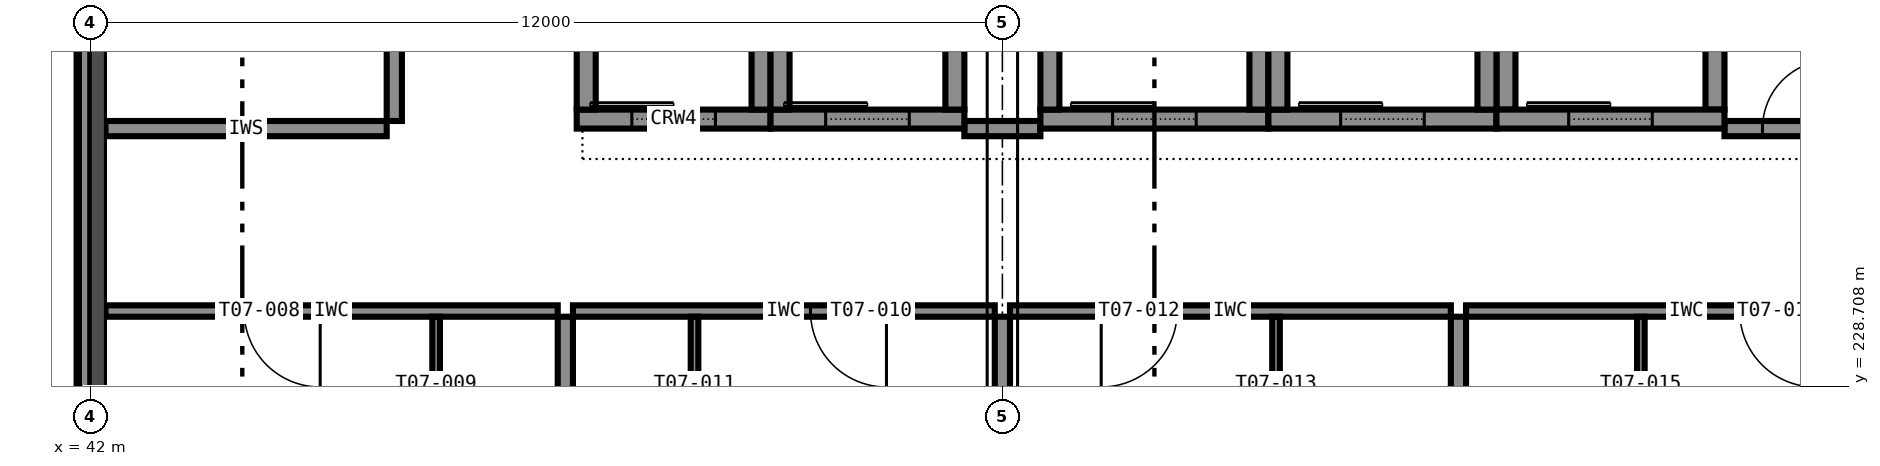
"""IFC4 building model, lengths in metres.
Left out: names, types, materials, properties, quantities, classifications, styles, units other than length and angle.
Written with IfcOpenShell. Run it as: python <this file> out.ifc"""

import sys

from ifc_helpers import new_model, si_unit, direction, frame, frame_2d, origin, place, context, subcontext, project, spatial, rectangle, extrude, element, fill, save


model = new_model("IFC4")
c1 = context("Model", 3, precision=1e-05, world=origin(), true_north=direction((0.0, 1.0)))
c2 = subcontext(c1, "Body", "Model", "MODEL_VIEW")
j1 = project(units=[si_unit("LENGTHUNIT", "METRE"), si_unit("PLANEANGLEUNIT", "RADIAN")], contexts=[c1])
p1 = place(None, origin())
s1 = spatial("IfcSite", under=j1, at=p1, CompositionType="ELEMENT")
p2 = place(p1, origin())
s2 = spatial("IfcBuilding", under=s1, at=p2, CompositionType="ELEMENT")
p3 = place(p2, frame((0.0, 0.0, 35.4)))
s3 = spatial("IfcBuildingStorey", under=s2, at=p3, CompositionType="ELEMENT", Elevation=35.4)
p4 = place(p3, frame((54.5, 232.225, 0.0), z_axis=(0.0, 0.0, 1.0), x_axis=(1.0, 0.0, 0.0)))
e1 = element("IfcWall", 1, at=p4, inside=s3, PredefinedType="SHEAR", context=c2, shape_type="SweptSolid", body=[
    extrude(rectangle(XDim=3.0, YDim=0.25, at=frame_2d((1.5, 0.0))), origin(), (0.0, 0.0, 1.0), 3.6),
])
p5 = place(p4, frame((0.95, 0.0, 0.0)))
e2 = element("IfcOpeningElement", 2, at=p5, cuts=e1, PredefinedType="OPENING", context=c2, shape_type="SweptSolid", body=[
    extrude(rectangle(XDim=1.1, YDim=2.1, at=frame_2d((0.55, 1.05))), frame((0.0, 0.135, 0.0), z_axis=(0.0, -1.0, 0.0), x_axis=(1.0, 0.0, 0.0)), (0.0, 0.0, 1.0), 0.27),
])
for number, where, z_axis, x_axis in (
    (3, (54.625, 232.35, 0.0), (0.0, 0.0, 1.0), (0.0, 1.0, 0.0)),
    (4, (57.375, 232.35, 0.0), (0.0, 0.0, 1.0), (0.0, 1.0, 0.0)),
):
    element("IfcWall", number, at=place(p3, frame(where, z_axis=z_axis, x_axis=x_axis)), inside=s3, PredefinedType="SHEAR", context=c2, shape_type="SweptSolid", body=[
        extrude(rectangle(XDim=3.3, YDim=0.25, at=frame_2d((1.65, 0.0))), origin(), (0.0, 0.0, 1.0), 3.6),
    ])
p6 = place(p3, frame((57.5, 232.225, 0.0), z_axis=(0.0, 0.0, 1.0), x_axis=(1.0, 0.0, 0.0)))
e5 = element("IfcWall", 5, at=p6, inside=s3, PredefinedType="SHEAR", context=c2, shape_type="SweptSolid", body=[
    extrude(rectangle(XDim=3.0, YDim=0.25, at=frame_2d((1.5, 0.0))), origin(), (0.0, 0.0, 1.0), 3.6),
])
p7 = place(p6, frame((0.95, 0.0, 0.0)))
e6 = element("IfcOpeningElement", 6, at=p7, cuts=e5, PredefinedType="OPENING", context=c2, shape_type="SweptSolid", body=[
    extrude(rectangle(XDim=1.1, YDim=2.1, at=frame_2d((0.55, 1.05))), frame((0.0, 0.135, 0.0), z_axis=(0.0, -1.0, 0.0), x_axis=(1.0, 0.0, 0.0)), (0.0, 0.0, 1.0), 0.27),
])
for number, where, z_axis, x_axis in (
    (7, (57.625, 232.35, 0.0), (0.0, 0.0, 1.0), (0.0, 1.0, 0.0)),
    (8, (60.375, 232.35, 0.0), (0.0, 0.0, 1.0), (0.0, 1.0, 0.0)),
):
    element("IfcWall", number, at=place(p3, frame(where, z_axis=z_axis, x_axis=x_axis)), inside=s3, PredefinedType="SHEAR", context=c2, shape_type="SweptSolid", body=[
        extrude(rectangle(XDim=3.3, YDim=0.25, at=frame_2d((1.65, 0.0))), origin(), (0.0, 0.0, 1.0), 3.6),
    ])
p8 = place(p3, frame((60.5, 232.225, 0.0), z_axis=(0.0, 0.0, 1.0), x_axis=(1.0, 0.0, 0.0)))
e9 = element("IfcWall", 9, at=p8, inside=s3, PredefinedType="SHEAR", context=c2, shape_type="SweptSolid", body=[
    extrude(rectangle(XDim=3.0, YDim=0.25, at=frame_2d((1.5, 0.0))), origin(), (0.0, 0.0, 1.0), 3.6),
])
p9 = place(p8, frame((0.95, 0.0, 0.0)))
e10 = element("IfcOpeningElement", 10, at=p9, cuts=e9, PredefinedType="OPENING", context=c2, shape_type="SweptSolid", body=[
    extrude(rectangle(XDim=1.1, YDim=2.1, at=frame_2d((0.55, 1.05))), frame((0.0, 0.135, 0.0), z_axis=(0.0, -1.0, 0.0), x_axis=(1.0, 0.0, 0.0)), (0.0, 0.0, 1.0), 0.27),
])
for number, where, z_axis, x_axis in (
    (11, (60.625, 232.35, 0.0), (0.0, 0.0, 1.0), (0.0, 1.0, 0.0)),
    (12, (63.375, 232.35, 0.0), (0.0, 0.0, 1.0), (0.0, 1.0, 0.0)),
):
    element("IfcWall", number, at=place(p3, frame(where, z_axis=z_axis, x_axis=x_axis)), inside=s3, PredefinedType="SHEAR", context=c2, shape_type="SweptSolid", body=[
        extrude(rectangle(XDim=3.3, YDim=0.25, at=frame_2d((1.65, 0.0))), origin(), (0.0, 0.0, 1.0), 3.6),
    ])
p10 = place(p3, frame((48.4, 232.225, 0.0), z_axis=(0.0, 0.0, 1.0), x_axis=(1.0, 0.0, 0.0)))
e13 = element("IfcWall", 13, at=p10, inside=s3, PredefinedType="SHEAR", context=c2, shape_type="SweptSolid", body=[
    extrude(rectangle(XDim=2.55, YDim=0.25, at=frame_2d((1.275, 0.0))), origin(), (0.0, 0.0, 1.0), 3.6),
])
p11 = place(p10, frame((0.725, 0.0, 0.0)))
e14 = element("IfcOpeningElement", 14, at=p11, cuts=e13, PredefinedType="OPENING", context=c2, shape_type="SweptSolid", body=[
    extrude(rectangle(XDim=1.1, YDim=2.1, at=frame_2d((0.55, 1.05))), frame((0.0, 0.135, 0.0), z_axis=(0.0, -1.0, 0.0), x_axis=(1.0, 0.0, 0.0)), (0.0, 0.0, 1.0), 0.27),
])
for number, where, z_axis, x_axis in (
    (15, (48.525, 232.35, 0.0), (0.0, 0.0, 1.0), (0.0, 1.0, 0.0)),
    (16, (50.825, 232.35, 0.0), (0.0, 0.0, 1.0), (0.0, 1.0, 0.0)),
):
    element("IfcWall", number, at=place(p3, frame(where, z_axis=z_axis, x_axis=x_axis)), inside=s3, PredefinedType="SHEAR", context=c2, shape_type="SweptSolid", body=[
        extrude(rectangle(XDim=3.3, YDim=0.25, at=frame_2d((1.65, 0.0))), origin(), (0.0, 0.0, 1.0), 3.6),
    ])
p12 = place(p3, frame((50.95, 232.225, 0.0), z_axis=(0.0, 0.0, 1.0), x_axis=(1.0, 0.0, 0.0)))
e17 = element("IfcWall", 17, at=p12, inside=s3, PredefinedType="SHEAR", context=c2, shape_type="SweptSolid", body=[
    extrude(rectangle(XDim=2.55, YDim=0.25, at=frame_2d((1.275, 0.0))), origin(), (0.0, 0.0, 1.0), 3.6),
])
p13 = place(p12, frame((0.725, 0.0, 0.0)))
e18 = element("IfcOpeningElement", 18, at=p13, cuts=e17, PredefinedType="OPENING", context=c2, shape_type="SweptSolid", body=[
    extrude(rectangle(XDim=1.1, YDim=2.1, at=frame_2d((0.55, 1.05))), frame((0.0, 0.135, 0.0), z_axis=(0.0, -1.0, 0.0), x_axis=(1.0, 0.0, 0.0)), (0.0, 0.0, 1.0), 0.27),
])
for number, where, z_axis, x_axis in (
    (19, (51.075, 232.35, 0.0), (0.0, 0.0, 1.0), (0.0, 1.0, 0.0)),
    (20, (53.375, 232.35, 0.0), (0.0, 0.0, 1.0), (0.0, 1.0, 0.0)),
):
    element("IfcWall", number, at=place(p3, frame(where, z_axis=z_axis, x_axis=x_axis)), inside=s3, PredefinedType="SHEAR", context=c2, shape_type="SweptSolid", body=[
        extrude(rectangle(XDim=3.3, YDim=0.25, at=frame_2d((1.65, 0.0))), origin(), (0.0, 0.0, 1.0), 3.6),
    ])
p14 = place(p3, frame((41.925, 233.6, 3.4), z_axis=(0.0, 0.0, 1.0), x_axis=(0.0, -1.0, 0.0)))
e21 = element("IfcWall", 21, at=p14, inside=s3, PredefinedType="STANDARD", context=c2, shape_type="SweptSolid", body=[
    extrude(rectangle(XDim=11.2, YDim=0.15, at=frame_2d((5.6, 0.0))), origin(), (0.0, 0.0, 1.0), 0.2),
])
p15 = place(p3, frame((42.2, 232.1, 0.0), z_axis=(0.0, 0.0, 1.0), x_axis=(1.0, 0.0, 0.0)))
e22 = element("IfcWall", 22, at=p15, inside=s3, PredefinedType="PARTITIONING", context=c2, shape_type="SweptSolid", body=[
    extrude(rectangle(XDim=3.7, YDim=0.2, at=frame_2d((1.85, 0.0))), origin(), (0.0, 0.0, 1.0), 3.4),
])
p16 = place(p3, frame((53.5, 232.1, 0.0), z_axis=(0.0, 0.0, 1.0), x_axis=(1.0, 0.0, 0.0)))
e23 = element("IfcWall", 23, at=p16, inside=s3, PredefinedType="PARTITIONING", context=c2, shape_type="SweptSolid", body=[
    extrude(rectangle(XDim=1.0, YDim=0.2, at=frame_2d((0.5, 0.0))), origin(), (0.0, 0.0, 1.0), 3.4),
])
p17 = place(p3, frame((63.5, 232.1, 0.0), z_axis=(0.0, 0.0, 1.0), x_axis=(1.0, 0.0, 0.0)))
e24 = element("IfcWall", 24, at=p17, inside=s3, PredefinedType="PARTITIONING", context=c2, shape_type="SweptSolid", body=[
    extrude(rectangle(XDim=1.9, YDim=0.2, at=frame_2d((0.95, 0.0))), origin(), (0.0, 0.0, 1.0), 3.4),
])
p18 = place(p17, frame((0.5, 0.0, 0.0)))
e25 = element("IfcOpeningElement", 25, at=p18, cuts=e24, PredefinedType="OPENING", context=c2, shape_type="SweptSolid", body=[
    extrude(rectangle(XDim=0.9, YDim=2.1, at=frame_2d((0.45, 1.05))), frame((0.0, 0.11, 0.0), z_axis=(0.0, -1.0, 0.0), x_axis=(1.0, 0.0, 0.0)), (0.0, 0.0, 1.0), 0.22),
])
p19 = place(p3, frame((46.0, 232.2, 0.0), z_axis=(0.0, 0.0, 1.0), x_axis=(0.0, 1.0, 0.0)))
e26 = element("IfcWall", 26, at=p19, inside=s3, PredefinedType="PARTITIONING", context=c2, shape_type="SweptSolid", body=[
    extrude(rectangle(XDim=3.6, YDim=0.2, at=frame_2d((1.8, 0.0))), origin(), (0.0, 0.0, 1.0), 3.4),
])
p20 = place(p19, frame((1.35, 0.0, 0.0)))
e27 = element("IfcOpeningElement", 27, at=p20, cuts=e26, PredefinedType="OPENING", context=c2, shape_type="SweptSolid", body=[
    extrude(rectangle(XDim=0.9, YDim=2.1, at=frame_2d((0.45, 1.05))), frame((0.0, 0.11, 0.0), z_axis=(0.0, -1.0, 0.0), x_axis=(1.0, 0.0, 0.0)), (0.0, 0.0, 1.0), 0.22),
])
p21 = place(p3, frame((48.15, 229.7, 0.0), z_axis=(0.0, 0.0, 1.0), x_axis=(-1.0, 0.0, 0.0)))
e28 = element("IfcWall", 28, at=p21, inside=s3, PredefinedType="PARTITIONING", context=c2, shape_type="SweptSolid", body=[
    extrude(rectangle(XDim=5.95, YDim=0.15, at=frame_2d((2.975, 0.0))), origin(), (0.0, 0.0, 1.0), 3.4),
])
p22 = place(p21, frame((3.125, 0.0, 0.0)))
e29 = element("IfcOpeningElement", 29, at=p22, cuts=e28, PredefinedType="OPENING", context=c2, shape_type="SweptSolid", body=[
    extrude(rectangle(XDim=1.0, YDim=2.1, at=frame_2d((0.5, 1.05))), frame((0.0, 0.085, 0.0), z_axis=(0.0, -1.0, 0.0), x_axis=(1.0, 0.0, 0.0)), (0.0, 0.0, 1.0), 0.17),
])
p23 = place(p3, frame((46.55, 226.75, 0.0), z_axis=(0.0, 0.0, 1.0), x_axis=(0.0, 1.0, 0.0)))
e30 = element("IfcWall", 30, at=p23, inside=s3, PredefinedType="PARTITIONING", context=c2, shape_type="SweptSolid", body=[
    extrude(rectangle(XDim=2.875, YDim=0.1, at=frame_2d((1.438, 0.0))), origin(), (0.0, 0.0, 1.0), 3.4),
])
p24 = place(p23, frame((1.038, 0.0, 0.0)))
e31 = element("IfcOpeningElement", 31, at=p24, cuts=e30, PredefinedType="OPENING", context=c2, shape_type="SweptSolid", body=[
    extrude(rectangle(XDim=0.8, YDim=2.1, at=frame_2d((0.4, 1.05))), frame((0.0, 0.06, 0.0), z_axis=(0.0, -1.0, 0.0), x_axis=(1.0, 0.0, 0.0)), (0.0, 0.0, 1.0), 0.12),
])
p25 = place(p3, frame((53.9, 229.7, 0.0), z_axis=(0.0, 0.0, 1.0), x_axis=(-1.0, 0.0, 0.0)))
e32 = element("IfcWall", 32, at=p25, inside=s3, PredefinedType="PARTITIONING", context=c2, shape_type="SweptSolid", body=[
    extrude(rectangle(XDim=5.55, YDim=0.15, at=frame_2d((2.775, 0.0))), origin(), (0.0, 0.0, 1.0), 3.4),
])
p26 = place(p25, frame((1.425, 0.0, 0.0)))
e33 = element("IfcOpeningElement", 33, at=p26, cuts=e32, PredefinedType="OPENING", context=c2, shape_type="SweptSolid", body=[
    extrude(rectangle(XDim=1.0, YDim=2.1, at=frame_2d((0.5, 1.05))), frame((0.0, 0.085, 0.0), z_axis=(0.0, -1.0, 0.0), x_axis=(1.0, 0.0, 0.0)), (0.0, 0.0, 1.0), 0.17),
])
p27 = place(p3, frame((49.95, 229.625, 0.0), z_axis=(0.0, 0.0, 1.0), x_axis=(0.0, -1.0, 0.0)))
e34 = element("IfcWall", 34, at=p27, inside=s3, PredefinedType="PARTITIONING", context=c2, shape_type="SweptSolid", body=[
    extrude(rectangle(XDim=2.875, YDim=0.1, at=frame_2d((1.438, 0.0))), origin(), (0.0, 0.0, 1.0), 3.4),
])
p28 = place(p27, frame((1.038, 0.0, 0.0)))
e35 = element("IfcOpeningElement", 35, at=p28, cuts=e34, PredefinedType="OPENING", context=c2, shape_type="SweptSolid", body=[
    extrude(rectangle(XDim=0.8, YDim=2.1, at=frame_2d((0.4, 1.05))), frame((0.0, 0.06, 0.0), z_axis=(0.0, -1.0, 0.0), x_axis=(1.0, 0.0, 0.0)), (0.0, 0.0, 1.0), 0.12),
])
p29 = place(p3, frame((59.9, 229.7, 0.0), z_axis=(0.0, 0.0, 1.0), x_axis=(-1.0, 0.0, 0.0)))
e36 = element("IfcWall", 36, at=p29, inside=s3, PredefinedType="PARTITIONING", context=c2, shape_type="SweptSolid", body=[
    extrude(rectangle(XDim=5.8, YDim=0.15, at=frame_2d((2.9, 0.0))), origin(), (0.0, 0.0, 1.0), 3.4),
])
p30 = place(p29, frame((3.6, 0.0, 0.0)))
e37 = element("IfcOpeningElement", 37, at=p30, cuts=e36, PredefinedType="OPENING", context=c2, shape_type="SweptSolid", body=[
    extrude(rectangle(XDim=1.0, YDim=2.1, at=frame_2d((0.5, 1.05))), frame((0.0, 0.085, 0.0), z_axis=(0.0, -1.0, 0.0), x_axis=(1.0, 0.0, 0.0)), (0.0, 0.0, 1.0), 0.17),
])
p31 = place(p3, frame((57.6, 226.75, 0.0), z_axis=(0.0, 0.0, 1.0), x_axis=(0.0, 1.0, 0.0)))
e38 = element("IfcWall", 38, at=p31, inside=s3, PredefinedType="PARTITIONING", context=c2, shape_type="SweptSolid", body=[
    extrude(rectangle(XDim=2.875, YDim=0.1, at=frame_2d((1.438, 0.0))), origin(), (0.0, 0.0, 1.0), 3.4),
])
p32 = place(p31, frame((1.038, 0.0, 0.0)))
e39 = element("IfcOpeningElement", 39, at=p32, cuts=e38, PredefinedType="OPENING", context=c2, shape_type="SweptSolid", body=[
    extrude(rectangle(XDim=0.8, YDim=2.1, at=frame_2d((0.4, 1.05))), frame((0.0, 0.06, 0.0), z_axis=(0.0, -1.0, 0.0), x_axis=(1.0, 0.0, 0.0)), (0.0, 0.0, 1.0), 0.12),
])
p33 = place(p3, frame((65.9, 229.7, 0.0), z_axis=(0.0, 0.0, 1.0), x_axis=(-1.0, 0.0, 0.0)))
e40 = element("IfcWall", 40, at=p33, inside=s3, PredefinedType="PARTITIONING", context=c2, shape_type="SweptSolid", body=[
    extrude(rectangle(XDim=5.8, YDim=0.15, at=frame_2d((2.9, 0.0))), origin(), (0.0, 0.0, 1.0), 3.4),
])
p34 = place(p33, frame((1.2, 0.0, 0.0)))
e41 = element("IfcOpeningElement", 41, at=p34, cuts=e40, PredefinedType="OPENING", context=c2, shape_type="SweptSolid", body=[
    extrude(rectangle(XDim=1.0, YDim=2.1, at=frame_2d((0.5, 1.05))), frame((0.0, 0.085, 0.0), z_axis=(0.0, -1.0, 0.0), x_axis=(1.0, 0.0, 0.0)), (0.0, 0.0, 1.0), 0.17),
])
p35 = place(p3, frame((62.4, 229.625, 0.0), z_axis=(0.0, 0.0, 1.0), x_axis=(0.0, -1.0, 0.0)))
e42 = element("IfcWall", 42, at=p35, inside=s3, PredefinedType="PARTITIONING", context=c2, shape_type="SweptSolid", body=[
    extrude(rectangle(XDim=2.875, YDim=0.1, at=frame_2d((1.438, 0.0))), origin(), (0.0, 0.0, 1.0), 3.4),
])
p36 = place(p35, frame((1.038, 0.0, 0.0)))
e43 = element("IfcOpeningElement", 43, at=p36, cuts=e42, PredefinedType="OPENING", context=c2, shape_type="SweptSolid", body=[
    extrude(rectangle(XDim=0.8, YDim=2.1, at=frame_2d((0.4, 1.05))), frame((0.0, 0.06, 0.0), z_axis=(0.0, -1.0, 0.0), x_axis=(1.0, 0.0, 0.0)), (0.0, 0.0, 1.0), 0.12),
])
p37 = place(p3, frame((48.25, 222.3, 0.0), z_axis=(0.0, 0.0, 1.0), x_axis=(0.0, 1.0, 0.0)))
e44 = element("IfcWall", 44, at=p37, inside=s3, PredefinedType="PARTITIONING", context=c2, shape_type="SweptSolid", body=[
    extrude(rectangle(XDim=7.325, YDim=0.2, at=frame_2d((3.663, 0.0))), origin(), (0.0, 0.0, 1.0), 3.4),
])
p38 = place(p3, frame((54.0, 222.4, 0.0), z_axis=(0.0, 0.0, 1.0), x_axis=(0.0, 1.0, 0.0)))
e45 = element("IfcWall", 45, at=p38, inside=s3, PredefinedType="PARTITIONING", context=c2, shape_type="SweptSolid", body=[
    extrude(rectangle(XDim=7.225, YDim=0.2, at=frame_2d((3.613, 0.0))), origin(), (0.0, 0.0, 1.0), 2.6),
])
p39 = place(p3, frame((60.0, 222.3, 0.0), z_axis=(0.0, 0.0, 1.0), x_axis=(0.0, 1.0, 0.0)))
e46 = element("IfcWall", 46, at=p39, inside=s3, PredefinedType="PARTITIONING", context=c2, shape_type="SweptSolid", body=[
    extrude(rectangle(XDim=7.325, YDim=0.2, at=frame_2d((3.663, 0.0))), origin(), (0.0, 0.0, 1.0), 3.4),
])
p40 = place(p18, origin())
e47 = element("IfcDoor", 47, at=p40, inside=s3, OperationType="SINGLE_SWING_RIGHT", PredefinedType="DOOR", context=c2, shape_type="SweptSolid", body=[
    extrude(rectangle(XDim=0.9, YDim=2.1, at=frame_2d((0.45, 1.05))), frame((0.0, 0.025, 0.0), z_axis=(0.0, -1.0, 0.0), x_axis=(1.0, 0.0, 0.0)), (0.0, 0.0, 1.0), 0.05),
])
fill(e25, e47)
p41 = place(p22, origin())
e48 = element("IfcDoor", 48, at=p41, inside=s3, OperationType="SINGLE_SWING_LEFT", PredefinedType="DOOR", context=c2, shape_type="SweptSolid", body=[
    extrude(rectangle(XDim=1.0, YDim=2.1, at=frame_2d((0.5, 1.05))), frame((0.0, 0.025, 0.0), z_axis=(0.0, -1.0, 0.0), x_axis=(1.0, 0.0, 0.0)), (0.0, 0.0, 1.0), 0.05),
])
fill(e29, e48)
p42 = place(p26, origin())
e49 = element("IfcDoor", 49, at=p42, inside=s3, OperationType="SINGLE_SWING_LEFT", PredefinedType="DOOR", context=c2, shape_type="SweptSolid", body=[
    extrude(rectangle(XDim=1.0, YDim=2.1, at=frame_2d((0.5, 1.05))), frame((0.0, 0.025, 0.0), z_axis=(0.0, -1.0, 0.0), x_axis=(1.0, 0.0, 0.0)), (0.0, 0.0, 1.0), 0.05),
])
fill(e33, e49)
p43 = place(p30, origin())
e50 = element("IfcDoor", 50, at=p43, inside=s3, OperationType="SINGLE_SWING_RIGHT", PredefinedType="DOOR", context=c2, shape_type="SweptSolid", body=[
    extrude(rectangle(XDim=1.0, YDim=2.1, at=frame_2d((0.5, 1.05))), frame((0.0, 0.025, 0.0), z_axis=(0.0, -1.0, 0.0), x_axis=(1.0, 0.0, 0.0)), (0.0, 0.0, 1.0), 0.05),
])
fill(e37, e50)
p44 = place(p34, origin())
e51 = element("IfcDoor", 51, at=p44, inside=s3, OperationType="SINGLE_SWING_LEFT", PredefinedType="DOOR", context=c2, shape_type="SweptSolid", body=[
    extrude(rectangle(XDim=1.0, YDim=2.1, at=frame_2d((0.5, 1.05))), frame((0.0, 0.025, 0.0), z_axis=(0.0, -1.0, 0.0), x_axis=(1.0, 0.0, 0.0)), (0.0, 0.0, 1.0), 0.05),
])
fill(e41, e51)
p45 = place(p5, origin())
e52 = element("IfcDoor", 52, at=p45, inside=s3, OperationType="SLIDING_TO_LEFT", PredefinedType="DOOR", context=c2, shape_type="SweptSolid", body=[
    extrude(rectangle(XDim=1.1, YDim=2.1, at=frame_2d((0.55, 1.05))), frame((0.0, 0.025, 0.0), z_axis=(0.0, -1.0, 0.0), x_axis=(1.0, 0.0, 0.0)), (0.0, 0.0, 1.0), 0.05),
])
fill(e2, e52)
p46 = place(p7, origin())
e53 = element("IfcDoor", 53, at=p46, inside=s3, OperationType="SLIDING_TO_LEFT", PredefinedType="DOOR", context=c2, shape_type="SweptSolid", body=[
    extrude(rectangle(XDim=1.1, YDim=2.1, at=frame_2d((0.55, 1.05))), frame((0.0, 0.025, 0.0), z_axis=(0.0, -1.0, 0.0), x_axis=(1.0, 0.0, 0.0)), (0.0, 0.0, 1.0), 0.05),
])
fill(e6, e53)
p47 = place(p9, origin())
e54 = element("IfcDoor", 54, at=p47, inside=s3, OperationType="SLIDING_TO_LEFT", PredefinedType="DOOR", context=c2, shape_type="SweptSolid", body=[
    extrude(rectangle(XDim=1.1, YDim=2.1, at=frame_2d((0.55, 1.05))), frame((0.0, 0.025, 0.0), z_axis=(0.0, -1.0, 0.0), x_axis=(1.0, 0.0, 0.0)), (0.0, 0.0, 1.0), 0.05),
])
fill(e10, e54)
p48 = place(p11, origin())
e55 = element("IfcDoor", 55, at=p48, inside=s3, OperationType="SLIDING_TO_LEFT", PredefinedType="DOOR", context=c2, shape_type="SweptSolid", body=[
    extrude(rectangle(XDim=1.1, YDim=2.1, at=frame_2d((0.55, 1.05))), frame((0.0, 0.025, 0.0), z_axis=(0.0, -1.0, 0.0), x_axis=(1.0, 0.0, 0.0)), (0.0, 0.0, 1.0), 0.05),
])
fill(e14, e55)
p49 = place(p13, origin())
e56 = element("IfcDoor", 56, at=p49, inside=s3, OperationType="SLIDING_TO_LEFT", PredefinedType="DOOR", context=c2, shape_type="SweptSolid", body=[
    extrude(rectangle(XDim=1.1, YDim=2.1, at=frame_2d((0.55, 1.05))), frame((0.0, 0.025, 0.0), z_axis=(0.0, -1.0, 0.0), x_axis=(1.0, 0.0, 0.0)), (0.0, 0.0, 1.0), 0.05),
])
fill(e18, e56)
save(model, sys.argv[1])
